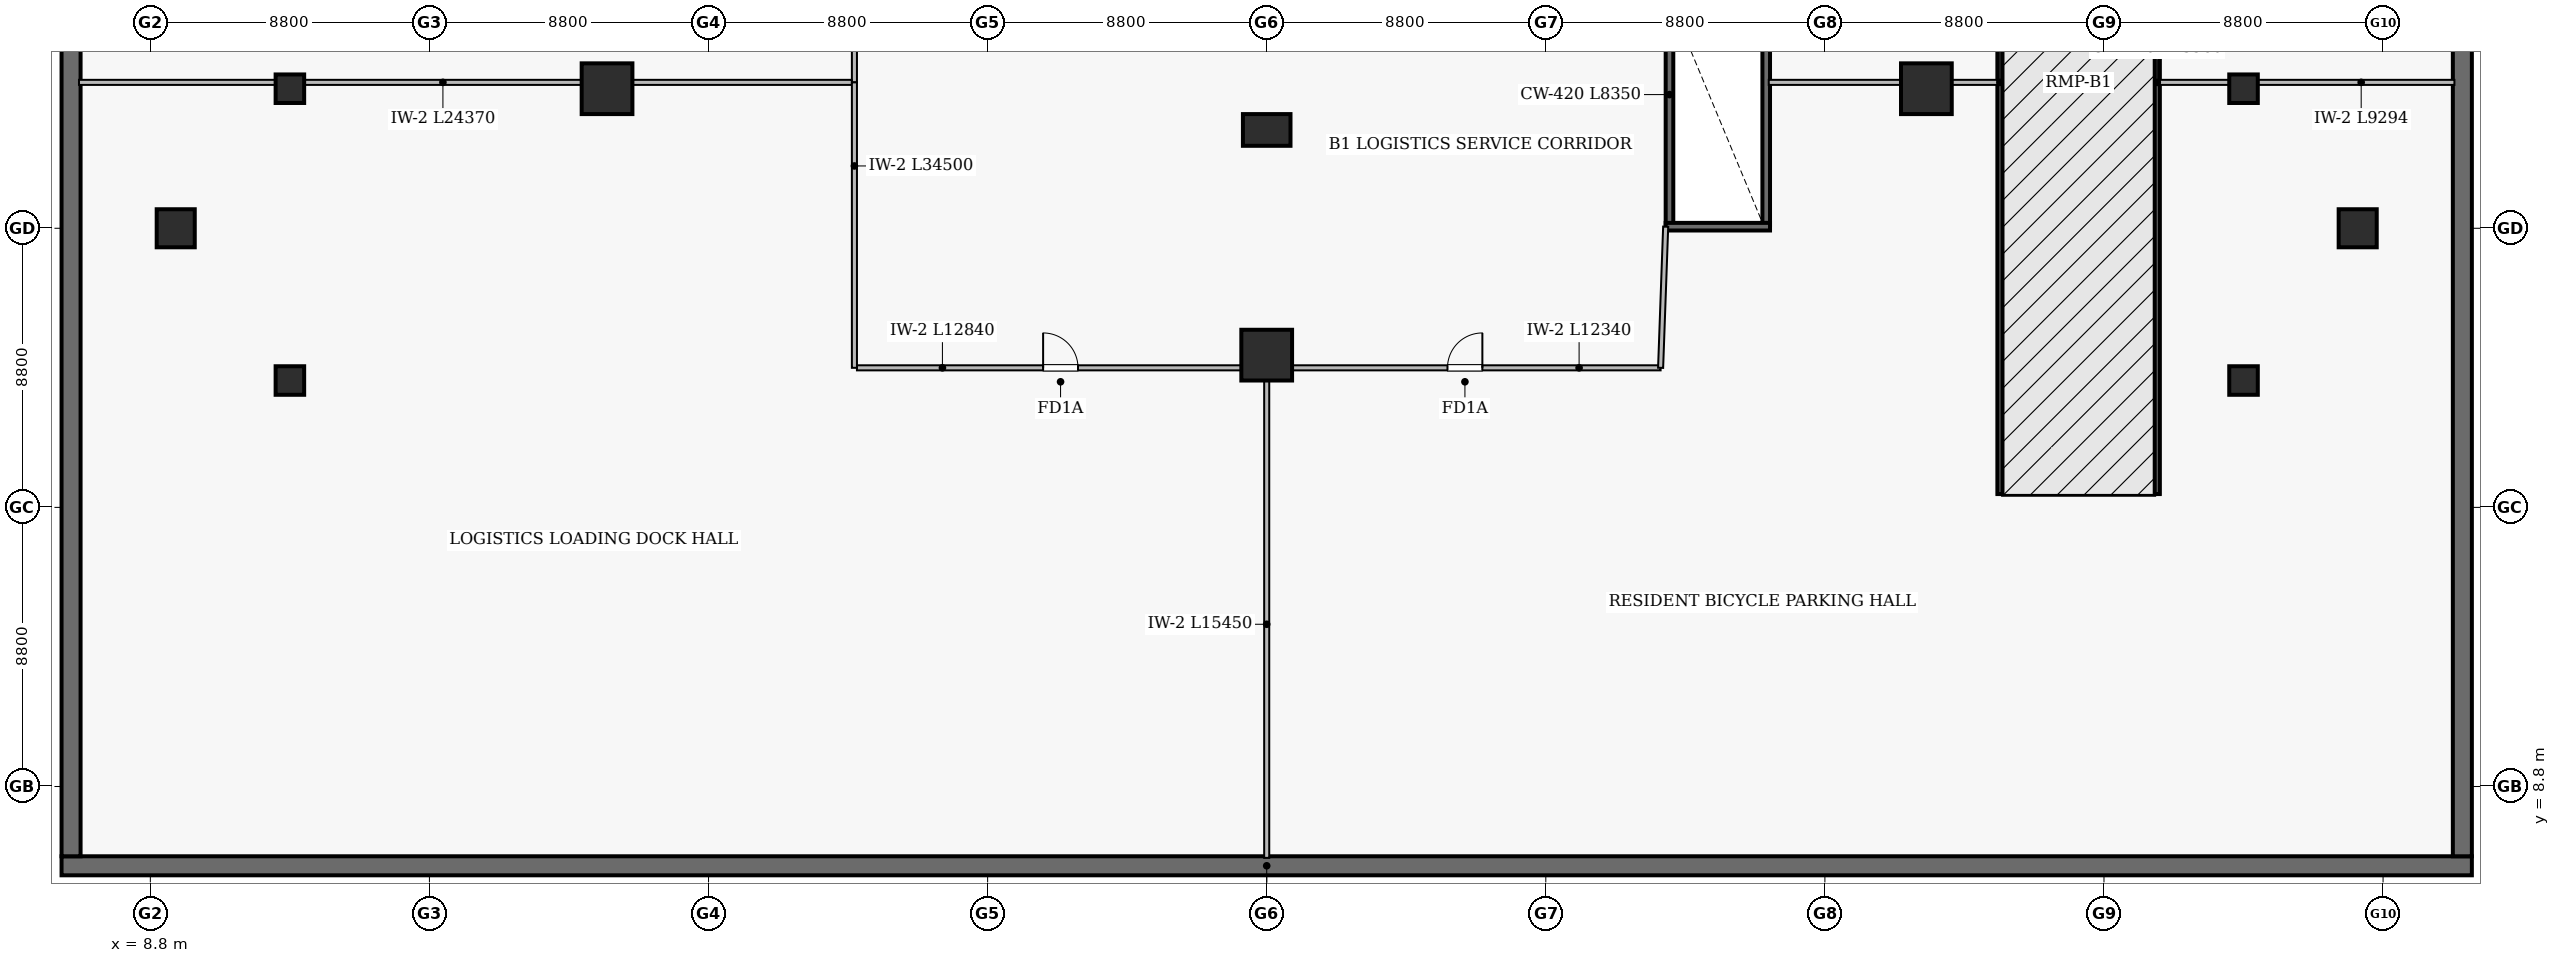
"""IFC4 building model, lengths in metres.
Left out: names, types, materials, properties, quantities, classifications, styles, units other than length and angle.
Written with IfcOpenShell. Run it as: python <this file> out.ifc"""

import sys

from ifc_helpers import new_model, si_unit, direction, frame, frame_2d, origin, origin_2d, place, context, subcontext, project, spatial, rectangle, extrude, element, fill, save


model = new_model("IFC4")
c1 = context("Model", 3, precision=1e-05, world=origin(), true_north=direction((0.0, 1.0)))
c2 = subcontext(c1, "Body", "Model", "MODEL_VIEW")
j1 = project(units=[si_unit("LENGTHUNIT", "METRE"), si_unit("PLANEANGLEUNIT", "RADIAN")], contexts=[c1])
p1 = place(None, origin())
s1 = spatial("IfcSite", under=j1, at=p1, CompositionType="ELEMENT")
p2 = place(p1, origin())
s2 = spatial("IfcBuilding", under=s1, at=p2, CompositionType="ELEMENT")
p3 = place(p2, frame((0.0, 0.0, -3.9)))
s3 = spatial("IfcBuildingStorey", under=s2, at=p3, CompositionType="ELEMENT", Elevation=-3.9)
for number, where, z_axis, x_axis in (
    (1, (67.12, 18.02, 0.0), (0.0, 0.0, 1.0), (0.0, 1.0, 0.0)),
    (2, (72.08, 18.02, 0.0), (0.0, 0.0, 1.0), (0.0, 1.0, 0.0)),
):
    element("IfcWall", number, at=place(p3, frame(where, z_axis=z_axis, x_axis=x_axis)), inside=s3, PredefinedType="SHEAR", context=c2, shape_type="SweptSolid", body=[
        extrude(rectangle(XDim=25.96, YDim=0.16, at=frame_2d((12.98, 0.0))), origin(), (0.0, 0.0, 1.0), 3.9),
    ])
p4 = place(p3, frame((6.0, 6.3, 0.0), z_axis=(0.0, 0.0, 1.0), x_axis=(1.0, 0.0, 0.0)))
e3 = element("IfcWall", 3, at=p4, inside=s3, PredefinedType="SOLIDWALL", context=c2, shape_type="SweptSolid", body=[
    extrude(rectangle(XDim=76.0, YDim=0.6, at=frame_2d((38.0, 0.0))), origin(), (0.0, 0.0, 1.0), 3.6),
])
for number, where, z_axis, x_axis in (
    (4, (81.7, 6.6, 0.0), (0.0, 0.0, 1.0), (0.0, 1.0, 0.0)),
    (5, (6.3, 81.4, 0.0), (0.0, 0.0, 1.0), (0.0, -1.0, 0.0)),
):
    element("IfcWall", number, at=place(p3, frame(where, z_axis=z_axis, x_axis=x_axis)), inside=s3, PredefinedType="SOLIDWALL", context=c2, shape_type="SweptSolid", body=[
        extrude(rectangle(XDim=74.8, YDim=0.6, at=frame_2d((37.4, 0.0))), origin(), (0.0, 0.0, 1.0), 3.6),
    ])
p5 = place(p3, frame((44.0, 29.5, 0.0), z_axis=(0.0, 0.0, 1.0), x_axis=(1.0, 0.0, 0.0)))
e6 = element("IfcColumn", 6, at=p5, inside=s3, PredefinedType="COLUMN", context=c2, shape_type="SweptSolid", body=[
    extrude(rectangle(XDim=1.5, YDim=1.0, at=origin_2d()), origin(), (0.0, 0.0, 1.0), 3.9),
])
for number, where, z_axis, x_axis in (
    (7, (64.8, 30.8, 0.0), (0.0, 0.0, 1.0), (1.0, 0.0, 0.0)),
    (8, (44.0, 22.4, 0.0), (0.0, 0.0, 1.0), (1.0, 0.0, 0.0)),
    (9, (23.2, 30.8, 0.0), (0.0, 0.0, 1.0), (1.0, 0.0, 0.0)),
):
    element("IfcColumn", number, at=place(p3, frame(where, z_axis=z_axis, x_axis=x_axis)), inside=s3, PredefinedType="COLUMN", context=c2, shape_type="SweptSolid", body=[
        extrude(rectangle(XDim=1.6, YDim=1.6, at=origin_2d()), origin(), (0.0, 0.0, 1.0), 3.9),
    ])
for number, where, z_axis, x_axis in (
    (10, (13.2, 21.6, 0.0), (0.0, 0.0, 1.0), (1.0, 0.0, 0.0)),
    (11, (13.2, 30.8, 0.0), (0.0, 0.0, 1.0), (1.0, 0.0, 0.0)),
    (12, (74.8, 21.6, 0.0), (0.0, 0.0, 1.0), (1.0, 0.0, 0.0)),
    (13, (74.8, 30.8, 0.0), (0.0, 0.0, 1.0), (1.0, 0.0, 0.0)),
):
    element("IfcColumn", number, at=place(p3, frame(where, z_axis=z_axis, x_axis=x_axis)), inside=s3, PredefinedType="COLUMN", context=c2, shape_type="SweptSolid", body=[
        extrude(rectangle(XDim=0.9, YDim=0.9, at=origin_2d()), origin(), (0.0, 0.0, 1.0), 3.9),
    ])
for number, where, z_axis, x_axis in (
    (14, (9.6, 26.4, 0.0), (0.0, 0.0, 1.0), (1.0, 0.0, 0.0)),
    (15, (78.4, 26.4, 0.0), (0.0, 0.0, 1.0), (1.0, 0.0, 0.0)),
):
    element("IfcColumn", number, at=place(p3, frame(where, z_axis=z_axis, x_axis=x_axis)), inside=s3, PredefinedType="COLUMN", context=c2, shape_type="SweptSolid", body=[
        extrude(rectangle(XDim=1.2, YDim=1.2, at=origin_2d()), origin(), (0.0, 0.0, 1.0), 3.9),
    ])
for number, where, z_axis, x_axis in (
    (16, (56.7, 26.5, 0.0), (0.0, 0.0, 1.0), (0.0, 1.0, 0.0)),
    (17, (59.75, 26.5, 0.0), (0.0, 0.0, 1.0), (0.0, 1.0, 0.0)),
):
    element("IfcWall", number, at=place(p3, frame(where, z_axis=z_axis, x_axis=x_axis)), inside=s3, PredefinedType="SHEAR", context=c2, shape_type="SweptSolid", body=[
        extrude(rectangle(XDim=8.35, YDim=0.24, at=frame_2d((4.175, 0.0))), origin(), (0.0, 0.0, 1.0), 3.6),
    ])
p6 = place(p3, frame((56.58, 26.45, 0.0), z_axis=(0.0, 0.0, 1.0), x_axis=(1.0, 0.0, 0.0)))
e18 = element("IfcWall", 18, at=p6, inside=s3, PredefinedType="SHEAR", context=c2, shape_type="SweptSolid", body=[
    extrude(rectangle(XDim=3.29, YDim=0.24, at=frame_2d((1.645, 0.0))), origin(), (0.0, 0.0, 1.0), 3.6),
])
p7 = place(p3, frame((31.0, 56.5, 0.0), z_axis=(0.0, 0.0, 1.0), x_axis=(0.0, -1.0, 0.0)))
e19 = element("IfcWall", 19, at=p7, inside=s3, PredefinedType="SOLIDWALL", context=c2, shape_type="SweptSolid", body=[
    extrude(rectangle(XDim=25.5, YDim=0.16, at=frame_2d((12.75, 0.0))), origin(), (0.0, 0.0, 1.0), 2.788),
])
p8 = place(p7, frame((12.2, 0.0, 0.0)))
e20 = element("IfcOpeningElement", 20, at=p8, cuts=e19, PredefinedType="OPENING", context=c2, shape_type="SweptSolid", body=[
    extrude(rectangle(XDim=1.1, YDim=2.15, at=frame_2d((0.55, 1.075))), frame((0.0, 0.09, 0.0), z_axis=(0.0, -1.0, 0.0), x_axis=(1.0, 0.0, 0.0)), (0.0, 0.0, 1.0), 0.18),
])
p9 = place(p3, frame((31.08, 22.0, 0.0), z_axis=(0.0, 0.0, 1.0), x_axis=(1.0, 0.0, 0.0)))
e21 = element("IfcWall", 21, at=p9, inside=s3, PredefinedType="SOLIDWALL", context=c2, shape_type="SweptSolid", body=[
    extrude(rectangle(XDim=12.84, YDim=0.16, at=frame_2d((6.42, 0.0))), origin(), (0.0, 0.0, 1.0), 3.188),
])
p10 = place(p9, frame((5.87, 0.0, 0.0)))
e22 = element("IfcOpeningElement", 22, at=p10, cuts=e21, PredefinedType="OPENING", context=c2, shape_type="SweptSolid", body=[
    extrude(rectangle(XDim=1.1, YDim=2.15, at=frame_2d((0.55, 1.075))), frame((0.0, 0.09, 0.0), z_axis=(0.0, -1.0, 0.0), x_axis=(1.0, 0.0, 0.0)), (0.0, 0.0, 1.0), 0.18),
])
p11 = place(p3, frame((44.08, 22.0, 0.0), z_axis=(0.0, 0.0, 1.0), x_axis=(1.0, 0.0, 0.0)))
e23 = element("IfcWall", 23, at=p11, inside=s3, PredefinedType="SOLIDWALL", context=c2, shape_type="SweptSolid", body=[
    extrude(rectangle(XDim=12.34, YDim=0.16, at=frame_2d((6.17, 0.0))), origin(), (0.0, 0.0, 1.0), 3.6),
])
p12 = place(p11, frame((5.62, 0.0, 0.0)))
e24 = element("IfcOpeningElement", 24, at=p12, cuts=e23, PredefinedType="OPENING", context=c2, shape_type="SweptSolid", body=[
    extrude(rectangle(XDim=1.1, YDim=2.15, at=frame_2d((0.55, 1.075))), frame((0.0, 0.09, 0.0), z_axis=(0.0, -1.0, 0.0), x_axis=(1.0, 0.0, 0.0)), (0.0, 0.0, 1.0), 0.18),
])
p13 = place(p3, frame((30.92, 31.0, 0.0), z_axis=(0.0, 0.0, 1.0), x_axis=(-1.0, 0.0, 0.0)))
e25 = element("IfcWall", 25, at=p13, inside=s3, PredefinedType="SOLIDWALL", context=c2, shape_type="SweptSolid", body=[
    extrude(rectangle(XDim=24.37, YDim=0.16, at=frame_2d((12.185, 0.0))), origin(), (0.0, 0.0, 1.0), 2.788),
])
p14 = place(p3, frame((44.0, 6.55, 0.0), z_axis=(0.0, 0.0, 1.0), x_axis=(0.0, 1.0, 0.0)))
e26 = element("IfcWall", 26, at=p14, inside=s3, PredefinedType="SOLIDWALL", context=c2, shape_type="SweptSolid", body=[
    extrude(rectangle(XDim=15.45, YDim=0.16, at=frame_2d((7.725, 0.0))), origin(), (0.0, 0.0, 1.0), 3.6),
])
p15 = place(p3, frame((81.45, 31.0, 0.0), z_axis=(0.0, 0.0, 1.0), x_axis=(-1.0, 0.0, 0.0)))
e27 = element("IfcWall", 27, at=p15, inside=s3, PredefinedType="SOLIDWALL", context=c2, shape_type="SweptSolid", body=[
    extrude(rectangle(XDim=9.294, YDim=0.16, at=frame_2d((4.647, 0.0))), origin(), (0.0, 0.0, 1.0), 3.6),
])
p16 = place(p3, frame((31.0, 31.0, 0.0), z_axis=(0.0, 0.0, 1.0), x_axis=(0.0, -1.0, 0.0)))
e28 = element("IfcWall", 28, at=p16, inside=s3, PredefinedType="SOLIDWALL", context=c2, shape_type="SweptSolid", body=[
    extrude(rectangle(XDim=9.0, YDim=0.16, at=frame_2d((4.5, 0.0))), origin(), (0.0, 0.0, 1.0), 2.888),
])
p17 = place(p3, frame((67.044, 31.0, 0.0), z_axis=(0.0, 0.0, 1.0), x_axis=(-1.0, 0.0, 0.0)))
e29 = element("IfcWall", 29, at=p17, inside=s3, PredefinedType="SOLIDWALL", context=c2, shape_type="SweptSolid", body=[
    extrude(rectangle(XDim=7.214, YDim=0.16, at=frame_2d((3.607, 0.0))), origin(), (0.0, 0.0, 1.0), 2.888),
])
p18 = place(p3, frame((56.42, 22.0, 0.0), z_axis=(0.0, 0.0, 1.0), x_axis=(0.03596727641, 0.999352968189, 0.0)))
e30 = element("IfcWall", 30, at=p18, inside=s3, PredefinedType="SOLIDWALL", context=c2, shape_type="SweptSolid", body=[
    extrude(rectangle(XDim=4.453, YDim=0.16, at=frame_2d((2.227, 0.0))), origin(), (0.0, 0.0, 1.0), 3.6),
])
p19 = place(p10, origin())
e31 = element("IfcDoor", 31, at=p19, inside=s3, OperationType="SINGLE_SWING_LEFT", PredefinedType="DOOR", context=c2, shape_type="SweptSolid", body=[
    extrude(rectangle(XDim=1.1, YDim=2.15, at=frame_2d((0.55, 1.075))), frame((0.0, 0.025, 0.0), z_axis=(0.0, -1.0, 0.0), x_axis=(1.0, 0.0, 0.0)), (0.0, 0.0, 1.0), 0.05),
])
fill(e22, e31)
p20 = place(p12, origin())
e32 = element("IfcDoor", 32, at=p20, inside=s3, OperationType="SINGLE_SWING_RIGHT", PredefinedType="DOOR", context=c2, shape_type="SweptSolid", body=[
    extrude(rectangle(XDim=1.1, YDim=2.15, at=frame_2d((0.55, 1.075))), frame((0.0, 0.025, 0.0), z_axis=(0.0, -1.0, 0.0), x_axis=(1.0, 0.0, 0.0)), (0.0, 0.0, 1.0), 0.05),
])
fill(e24, e32)
save(model, sys.argv[1])
